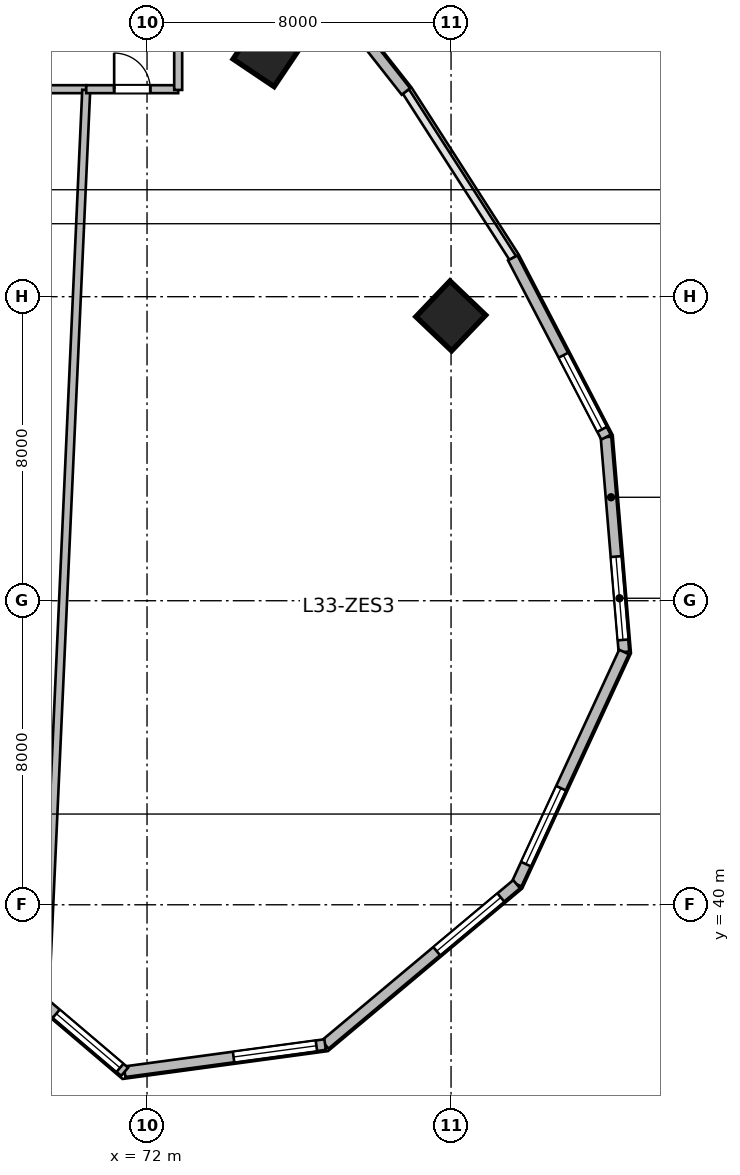
"""IFC4 building model, lengths in metres.
Left out: names, types, materials, properties, quantities, classifications, styles, units other than length and angle.
Written with IfcOpenShell. Run it as: python <this file> out.ifc"""

import sys

from ifc_helpers import new_model, si_unit, direction, frame, frame_2d, origin, origin_2d, place, context, subcontext, project, spatial, rectangle, extrude, source, transform, mapped, element, fill, save


model = new_model("IFC4")
c1 = context("Model", 3, precision=1e-05, world=origin(), true_north=direction((0.0, 1.0)))
c2 = subcontext(c1, "Body", "Model", "MODEL_VIEW")
j1 = project(units=[si_unit("LENGTHUNIT", "METRE"), si_unit("PLANEANGLEUNIT", "RADIAN")], contexts=[c1])
p1 = place(None, origin())
s1 = spatial("IfcSite", under=j1, at=p1, CompositionType="ELEMENT")
p2 = place(p1, origin())
s2 = spatial("IfcBuilding", under=s1, at=p2, CompositionType="ELEMENT")
p3 = place(p2, frame((0.0, 0.0, 138.9)))
s3 = spatial("IfcBuildingStorey", under=s2, at=p3, CompositionType="ELEMENT", Elevation=138.9)
m1 = source(origin(), c2, "Body", "SweptSolid", [
    extrude(rectangle(XDim=1.3, YDim=1.3, at=origin_2d()), origin(), (0.0, 0.0, 1.0), 3.9),
])
for number, where, z_axis, x_axis in (
    (1, (75.167, 62.43, 0.0), (0.0, 0.0, 1.0), (0.558, 0.83, 0.0)),
    (2, (79.993, 55.494, 0.0), (0.0, 0.0, 1.0), (0.691, 0.723, 0.0)),
):
    element("IfcColumn", number, at=place(p3, frame(where, z_axis=z_axis, x_axis=x_axis)), inside=s3, PredefinedType="COLUMN", context=c2, shape_type="MappedRepresentation", body=[
        mapped(m1, transform((0.0, 0.0, 0.0), scale=1.0)),
    ])
m2 = source(origin(), c2, "Body", "SweptSolid", [
    extrude(rectangle(XDim=5.674, YDim=0.28, at=frame_2d((2.837, 0.0))), origin(), (0.0, 0.0, 1.0), 3.65),
])
p4 = place(p3, frame((84.078, 52.305, 0.0), z_axis=(0.0, 0.0, 1.0), x_axis=(0.083309007867, -0.996523762491, 0.0)))
e3 = element("IfcWall", 3, at=p4, inside=s3, PredefinedType="SOLIDWALL", context=c2, shape_type="MappedRepresentation", body=[
    mapped(m2, transform((0.0, 0.0, 0.0), scale=1.0)),
])
p5 = place(p4, frame((3.155, 0.0, 0.95)))
e4 = element("IfcOpeningElement", 4, at=p5, cuts=e3, PredefinedType="OPENING", context=c2, shape_type="SweptSolid", body=[
    extrude(rectangle(XDim=2.2, YDim=2.1, at=frame_2d((1.1, 1.05))), frame((0.0, 0.15, 0.0), z_axis=(0.0, -1.0, 0.0), x_axis=(1.0, 0.0, 0.0)), (0.0, 0.0, 1.0), 0.3),
])
m3 = source(origin(), c2, "Body", "SweptSolid", [
    extrude(rectangle(XDim=6.732, YDim=0.28, at=frame_2d((3.366, 0.0))), origin(), (0.0, 0.0, 1.0), 3.65),
])
p6 = place(p3, frame((84.55, 46.652, 0.0), z_axis=(0.0, 0.0, 1.0), x_axis=(-0.419644552709, -0.907688520023, 0.0)))
e5 = element("IfcWall", 5, at=p6, inside=s3, PredefinedType="SOLIDWALL", context=c2, shape_type="MappedRepresentation", body=[
    mapped(m3, transform((0.0, 0.0, 0.0), scale=1.0)),
])
p7 = place(p6, frame((3.949, 0.0, 0.95)))
e6 = element("IfcOpeningElement", 6, at=p7, cuts=e5, PredefinedType="OPENING", context=c2, shape_type="SweptSolid", body=[
    extrude(rectangle(XDim=2.2, YDim=2.1, at=frame_2d((1.1, 1.05))), frame((0.0, 0.15, 0.0), z_axis=(0.0, -1.0, 0.0), x_axis=(1.0, 0.0, 0.0)), (0.0, 0.0, 1.0), 0.3),
])
m4 = source(origin(), c2, "Body", "SweptSolid", [
    extrude(rectangle(XDim=6.573, YDim=0.28, at=frame_2d((3.287, 0.0))), origin(), (0.0, 0.0, 1.0), 3.65),
])
p8 = place(p3, frame((81.725, 40.541, 0.0), z_axis=(0.0, 0.0, 1.0), x_axis=(-0.766715154163, -0.641987439423, 0.0)))
e7 = element("IfcWall", 7, at=p8, inside=s3, PredefinedType="SOLIDWALL", context=c2, shape_type="MappedRepresentation", body=[
    mapped(m4, transform((0.0, 0.0, 0.0), scale=1.0)),
])
p9 = place(p8, frame((0.543, 0.0, 0.95)))
e8 = element("IfcOpeningElement", 8, at=p9, cuts=e7, PredefinedType="OPENING", context=c2, shape_type="SweptSolid", body=[
    extrude(rectangle(XDim=2.2, YDim=2.1, at=frame_2d((1.1, 1.05))), frame((0.0, 0.15, 0.0), z_axis=(0.0, -1.0, 0.0), x_axis=(1.0, 0.0, 0.0)), (0.0, 0.0, 1.0), 0.3),
])
m5 = source(origin(), c2, "Body", "SweptSolid", [
    extrude(rectangle(XDim=5.324, YDim=0.28, at=frame_2d((2.662, 0.0))), origin(), (0.0, 0.0, 1.0), 3.65),
])
p10 = place(p3, frame((76.686, 36.322, 0.0), z_axis=(0.0, 0.0, 1.0), x_axis=(-0.990931467223, -0.134368252451, 0.0)))
e9 = element("IfcWall", 9, at=p10, inside=s3, PredefinedType="SOLIDWALL", context=c2, shape_type="MappedRepresentation", body=[
    mapped(m5, transform((0.0, 0.0, 0.0), scale=1.0)),
])
p11 = place(p10, frame((0.231, 0.0, 0.95)))
e10 = element("IfcOpeningElement", 10, at=p11, cuts=e9, PredefinedType="OPENING", context=c2, shape_type="SweptSolid", body=[
    extrude(rectangle(XDim=2.2, YDim=2.1, at=frame_2d((1.1, 1.05))), frame((0.0, 0.15, 0.0), z_axis=(0.0, -1.0, 0.0), x_axis=(1.0, 0.0, 0.0)), (0.0, 0.0, 1.0), 0.3),
])
m6 = source(origin(), c2, "Body", "SweptSolid", [
    extrude(rectangle(XDim=4.659, YDim=0.28, at=frame_2d((2.33, 0.0))), origin(), (0.0, 0.0, 1.0), 3.65),
])
p12 = place(p3, frame((71.41, 35.606, 0.0), z_axis=(0.0, 0.0, 1.0), x_axis=(-0.761913458795, 0.647678841176, 0.0)))
e11 = element("IfcWall", 11, at=p12, inside=s3, PredefinedType="SOLIDWALL", context=c2, shape_type="MappedRepresentation", body=[
    mapped(m6, transform((0.0, 0.0, 0.0), scale=1.0)),
])
p13 = place(p12, frame((0.16, 0.0, 0.95)))
e12 = element("IfcOpeningElement", 12, at=p13, cuts=e11, PredefinedType="OPENING", context=c2, shape_type="SweptSolid", body=[
    extrude(rectangle(XDim=2.2, YDim=2.1, at=frame_2d((1.1, 1.05))), frame((0.0, 0.15, 0.0), z_axis=(0.0, -1.0, 0.0), x_axis=(1.0, 0.0, 0.0)), (0.0, 0.0, 1.0), 0.3),
])
m7 = source(origin(), c2, "Body", "SweptSolid", [
    extrude(rectangle(XDim=5.058, YDim=0.28, at=frame_2d((2.529, 0.0))), origin(), (0.0, 0.0, 1.0), 3.65),
])
p14 = place(p3, frame((75.685, 65.376, 0.0), z_axis=(0.0, 0.0, 1.0), x_axis=(0.618145507434, -0.786063694391, 0.0)))
e13 = element("IfcWall", 13, at=p14, inside=s3, PredefinedType="SOLIDWALL", context=c2, shape_type="MappedRepresentation", body=[
    mapped(m7, transform((0.0, 0.0, 0.0), scale=1.0)),
])
m8 = source(origin(), c2, "Body", "SweptSolid", [
    extrude(rectangle(XDim=5.315, YDim=0.28, at=frame_2d((2.658, 0.0))), origin(), (0.0, 0.0, 1.0), 3.65),
])
p15 = place(p3, frame((81.623, 57.02, 0.0), z_axis=(0.0, 0.0, 1.0), x_axis=(0.461760527822, -0.887004630735, 0.0)))
e14 = element("IfcWall", 14, at=p15, inside=s3, PredefinedType="SOLIDWALL", context=c2, shape_type="MappedRepresentation", body=[
    mapped(m8, transform((0.0, 0.0, 0.0), scale=1.0)),
])
p16 = place(p15, frame((2.886, 0.0, 0.95)))
e15 = element("IfcOpeningElement", 15, at=p16, cuts=e14, PredefinedType="OPENING", context=c2, shape_type="SweptSolid", body=[
    extrude(rectangle(XDim=2.2, YDim=2.1, at=frame_2d((1.1, 1.05))), frame((0.0, 0.15, 0.0), z_axis=(0.0, -1.0, 0.0), x_axis=(1.0, 0.0, 0.0)), (0.0, 0.0, 1.0), 0.3),
])
m9 = source(origin(), c2, "Body", "SweptSolid", [
    extrude(rectangle(XDim=4.6, YDim=0.21, at=frame_2d((2.3, 0.0))), origin(), (0.0, 0.0, 1.0), 3.65),
])
p17 = place(p3, frame((65.8, 61.46, 0.0), z_axis=(0.0, 0.0, 1.0), x_axis=(1.0, 0.0, 0.0)))
e16 = element("IfcWall", 16, at=p17, inside=s3, PredefinedType="PARTITIONING", context=c2, shape_type="MappedRepresentation", body=[
    mapped(m9, transform((0.0, 0.0, 0.0), scale=1.0)),
])
p18 = place(p17, frame((1.825, 0.0, 0.0)))
e17 = element("IfcOpeningElement", 17, at=p18, cuts=e16, PredefinedType="OPENING", context=c2, shape_type="SweptSolid", body=[
    extrude(rectangle(XDim=0.95, YDim=2.1, at=frame_2d((0.475, 1.05))), frame((0.0, 0.115, 0.0), z_axis=(0.0, -1.0, 0.0), x_axis=(1.0, 0.0, 0.0)), (0.0, 0.0, 1.0), 0.23),
])
m10 = source(origin(), c2, "Body", "SweptSolid", [
    extrude(rectangle(XDim=24.224, YDim=0.21, at=frame_2d((12.112, 0.0))), origin(), (0.0, 0.0, 1.0), 2.942),
])
p19 = place(p3, frame((69.302, 37.241, 0.0), z_axis=(0.0, 0.0, 1.0), x_axis=(0.045312570313, 0.998972857975, 0.0)))
e18 = element("IfcWall", 18, at=p19, inside=s3, PredefinedType="PARTITIONING", context=c2, shape_type="MappedRepresentation", body=[
    mapped(m10, transform((0.0, 0.0, 0.0), scale=1.0)),
])
m11 = source(origin(), c2, "Body", "SweptSolid", [
    extrude(rectangle(XDim=2.42, YDim=0.21, at=frame_2d((1.21, 0.0))), origin(), (0.0, 0.0, 1.0), 3.65),
])
p20 = place(p3, frame((70.4, 61.46, 0.0), z_axis=(0.0, 0.0, 1.0), x_axis=(1.0, 0.0, 0.0)))
e19 = element("IfcWall", 19, at=p20, inside=s3, PredefinedType="PARTITIONING", context=c2, shape_type="MappedRepresentation", body=[
    mapped(m11, transform((0.0, 0.0, 0.0), scale=1.0)),
])
p21 = place(p20, frame((0.735, 0.0, 0.0)))
e20 = element("IfcOpeningElement", 20, at=p21, cuts=e19, PredefinedType="OPENING", context=c2, shape_type="SweptSolid", body=[
    extrude(rectangle(XDim=0.95, YDim=2.1, at=frame_2d((0.475, 1.05))), frame((0.0, 0.115, 0.0), z_axis=(0.0, -1.0, 0.0), x_axis=(1.0, 0.0, 0.0)), (0.0, 0.0, 1.0), 0.23),
])
m12 = source(origin(), c2, "Body", "SweptSolid", [
    extrude(rectangle(XDim=2.62, YDim=0.21, at=frame_2d((1.31, 0.0))), origin(), (0.0, 0.0, 1.0), 3.28),
])
p22 = place(p3, frame((72.82, 61.44, 0.0), z_axis=(0.0, 0.0, 1.0), x_axis=(0.0, 1.0, 0.0)))
e21 = element("IfcWall", 21, at=p22, inside=s3, PredefinedType="PARTITIONING", context=c2, shape_type="MappedRepresentation", body=[
    mapped(m12, transform((0.0, 0.0, 0.0), scale=1.0)),
])
m13 = source(origin(), c2, "Body", "SweptSolid", [
    extrude(rectangle(XDim=2.2, YDim=2.1, at=frame_2d((1.1, 1.05))), frame((0.0, 0.03, 0.0), z_axis=(0.0, -1.0, 0.0), x_axis=(1.0, 0.0, 0.0)), (0.0, 0.0, 1.0), 0.06),
])
p23 = place(p5, origin())
e22 = element("IfcWindow", 22, at=p23, inside=s3, PartitioningType="TRIPLE_PANEL_VERTICAL", PredefinedType="WINDOW", context=c2, shape_type="MappedRepresentation", body=[
    mapped(m13, transform((0.0, 0.0, 0.0), scale=1.0)),
])
fill(e4, e22)
p24 = place(p7, origin())
e23 = element("IfcWindow", 23, at=p24, inside=s3, PartitioningType="TRIPLE_PANEL_VERTICAL", PredefinedType="WINDOW", context=c2, shape_type="MappedRepresentation", body=[
    mapped(m13, transform((0.0, 0.0, 0.0), scale=1.0)),
])
fill(e6, e23)
p25 = place(p9, origin())
e24 = element("IfcWindow", 24, at=p25, inside=s3, PartitioningType="TRIPLE_PANEL_VERTICAL", PredefinedType="WINDOW", context=c2, shape_type="MappedRepresentation", body=[
    mapped(m13, transform((0.0, 0.0, 0.0), scale=1.0)),
])
fill(e8, e24)
p26 = place(p11, origin())
e25 = element("IfcWindow", 25, at=p26, inside=s3, PartitioningType="TRIPLE_PANEL_VERTICAL", PredefinedType="WINDOW", context=c2, shape_type="MappedRepresentation", body=[
    mapped(m13, transform((0.0, 0.0, 0.0), scale=1.0)),
])
fill(e10, e25)
p27 = place(p13, origin())
e26 = element("IfcWindow", 26, at=p27, inside=s3, PartitioningType="TRIPLE_PANEL_VERTICAL", PredefinedType="WINDOW", context=c2, shape_type="MappedRepresentation", body=[
    mapped(m13, transform((0.0, 0.0, 0.0), scale=1.0)),
])
fill(e12, e26)
p28 = place(p16, origin())
e27 = element("IfcWindow", 27, at=p28, inside=s3, PartitioningType="TRIPLE_PANEL_VERTICAL", PredefinedType="WINDOW", context=c2, shape_type="MappedRepresentation", body=[
    mapped(m13, transform((0.0, 0.0, 0.0), scale=1.0)),
])
fill(e15, e27)
m14 = source(origin(), c2, "Body", "SweptSolid", [
    extrude(rectangle(XDim=0.95, YDim=2.1, at=frame_2d((0.475, 1.05))), frame((0.0, 0.025, 0.0), z_axis=(0.0, -1.0, 0.0), x_axis=(1.0, 0.0, 0.0)), (0.0, 0.0, 1.0), 0.05),
])
p29 = place(p21, origin())
e28 = element("IfcDoor", 28, at=p29, inside=s3, OperationType="SINGLE_SWING_LEFT", PredefinedType="DOOR", context=c2, shape_type="MappedRepresentation", body=[
    mapped(m14, transform((0.0, 0.0, 0.0), scale=1.0)),
])
fill(e20, e28)
save(model, sys.argv[1])
